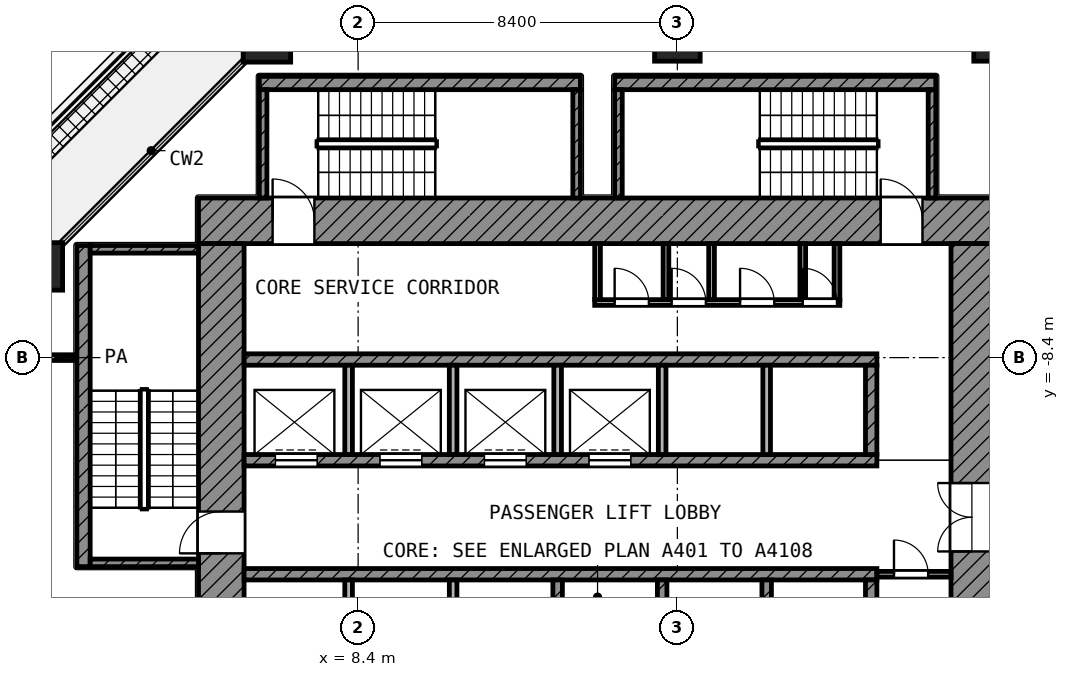
"""IFC4 building model, lengths in metres.
Left out: names, types, materials, properties, quantities, classifications, styles, units other than length and angle.
Written with IfcOpenShell. Run it as: python <this file> out.ifc"""

import sys

from ifc_helpers import new_model, si_unit, direction, frame, frame_2d, origin, origin_2d, place, context, subcontext, project, spatial, rectangle, extrude, element, fill, save


model = new_model("IFC4")
c1 = context("Model", 3, precision=1e-05, world=origin(), true_north=direction((0.0, 1.0)))
c2 = subcontext(c1, "Body", "Model", "MODEL_VIEW")
j1 = project(units=[si_unit("LENGTHUNIT", "METRE"), si_unit("PLANEANGLEUNIT", "RADIAN")], contexts=[c1])
p1 = place(None, origin())
s1 = spatial("IfcSite", under=j1, at=p1, CompositionType="ELEMENT")
p2 = place(p1, origin())
s2 = spatial("IfcBuilding", under=s1, at=p2, CompositionType="ELEMENT")
p3 = place(p2, frame((0.0, 0.0, 64.4)))
s3 = spatial("IfcBuildingStorey", under=s2, at=p3, CompositionType="ELEMENT", Elevation=64.4)
p4 = place(p3, frame((6.0, 0.0, 0.0), z_axis=(0.0, 0.0, 1.0), x_axis=(1.0, 0.0, 0.0)))
e1 = element("IfcColumn", 1, at=p4, inside=s3, PredefinedType="COLUMN", context=c2, shape_type="SweptSolid", body=[
    extrude(rectangle(XDim=1.25, YDim=1.25, at=origin_2d()), origin(), (0.0, 0.0, 1.0), 4.2),
])
for number, where, z_axis, x_axis in (
    (2, (16.8, 0.0, 0.0), (0.0, 0.0, 1.0), (1.0, 0.0, 0.0)),
    (3, (25.2, 0.0, 0.0), (0.0, 0.0, 1.0), (1.0, 0.0, 0.0)),
):
    element("IfcColumn", number, at=place(p3, frame(where, z_axis=z_axis, x_axis=x_axis)), inside=s3, PredefinedType="COLUMN", context=c2, shape_type="SweptSolid", body=[
        extrude(rectangle(XDim=1.2, YDim=1.2, at=origin_2d()), origin(), (0.0, 0.0, 1.0), 4.2),
    ])
p5 = place(p3, frame((0.0, -6.0, 0.0), z_axis=(0.0, 0.0, 1.0), x_axis=(1.0, 0.0, 0.0)))
e4 = element("IfcColumn", 4, at=p5, inside=s3, PredefinedType="COLUMN", context=c2, shape_type="SweptSolid", body=[
    extrude(rectangle(XDim=1.25, YDim=1.25, at=origin_2d()), origin(), (0.0, 0.0, 1.0), 4.2),
])
p6 = place(p3, frame((4.2, -4.8, 0.0), z_axis=(0.0, 0.0, 1.0), x_axis=(1.0, 0.0, 0.0)))
e5 = element("IfcWall", 5, at=p6, inside=s3, PredefinedType="SHEAR", context=c2, shape_type="SweptSolid", body=[
    extrude(rectangle(XDim=20.9, YDim=1.2, at=frame_2d((10.45, 0.0))), origin(), (0.0, 0.0, 1.0), 3.9),
])
p7 = place(p6, frame((1.95, 0.0, 0.0)))
e6 = element("IfcOpeningElement", 6, at=p7, cuts=e5, PredefinedType="OPENING", context=c2, shape_type="SweptSolid", body=[
    extrude(rectangle(XDim=1.1, YDim=2.1, at=frame_2d((0.55, 1.05))), frame((0.0, 0.61, 0.0), z_axis=(0.0, -1.0, 0.0), x_axis=(1.0, 0.0, 0.0)), (0.0, 0.0, 1.0), 1.22),
])
p8 = place(p6, frame((17.95, 0.0, 0.0)))
e7 = element("IfcOpeningElement", 7, at=p8, cuts=e5, PredefinedType="OPENING", context=c2, shape_type="SweptSolid", body=[
    extrude(rectangle(XDim=1.1, YDim=2.1, at=frame_2d((0.55, 1.05))), frame((0.0, 0.61, 0.0), z_axis=(0.0, -1.0, 0.0), x_axis=(1.0, 0.0, 0.0)), (0.0, 0.0, 1.0), 1.22),
])
p9 = place(p3, frame((4.8, -25.1, 0.0), z_axis=(0.0, 0.0, 1.0), x_axis=(0.0, 1.0, 0.0)))
e8 = element("IfcWall", 8, at=p9, inside=s3, PredefinedType="SHEAR", context=c2, shape_type="SweptSolid", body=[
    extrude(rectangle(XDim=19.7, YDim=1.2, at=frame_2d((9.85, 0.0))), origin(), (0.0, 0.0, 1.0), 3.9),
])
p10 = place(p9, frame((11.55, 0.0, 0.0)))
e9 = element("IfcOpeningElement", 9, at=p10, cuts=e8, PredefinedType="OPENING", context=c2, shape_type="SweptSolid", body=[
    extrude(rectangle(XDim=1.1, YDim=2.1, at=frame_2d((0.55, 1.05))), frame((0.0, 0.61, 0.0), z_axis=(0.0, -1.0, 0.0), x_axis=(1.0, 0.0, 0.0)), (0.0, 0.0, 1.0), 1.22),
])
p11 = place(p9, frame((2.25, 0.0, 0.0)))
e10 = element("IfcOpeningElement", 10, at=p11, cuts=e8, PredefinedType="OPENING", context=c2, shape_type="SweptSolid", body=[
    extrude(rectangle(XDim=1.1, YDim=2.1, at=frame_2d((0.55, 1.05))), frame((0.0, 0.61, 0.0), z_axis=(0.0, -1.0, 0.0), x_axis=(1.0, 0.0, 0.0)), (0.0, 0.0, 1.0), 1.22),
])
p12 = place(p3, frame((24.55, -24.0, 0.0), z_axis=(0.0, 0.0, 1.0), x_axis=(0.0, 1.0, 0.0)))
e11 = element("IfcWall", 11, at=p12, inside=s3, PredefinedType="SHEAR", context=c2, shape_type="SweptSolid", body=[
    extrude(rectangle(XDim=18.6, YDim=1.1, at=frame_2d((9.3, 0.0))), origin(), (0.0, 0.0, 1.0), 3.9),
])
p13 = place(p12, frame((10.5, 0.0, 0.0)))
e12 = element("IfcOpeningElement", 12, at=p13, cuts=e11, PredefinedType="OPENING", context=c2, shape_type="SweptSolid", body=[
    extrude(rectangle(XDim=1.8, YDim=2.1, at=frame_2d((0.9, 1.05))), frame((0.0, 0.56, 0.0), z_axis=(0.0, -1.0, 0.0), x_axis=(1.0, 0.0, 0.0)), (0.0, 0.0, 1.0), 1.12),
])
p14 = place(p3, frame((5.4, -8.45, 0.0), z_axis=(0.0, 0.0, 1.0), x_axis=(1.0, 0.0, 0.0)))
e13 = element("IfcWall", 13, at=p14, inside=s3, PredefinedType="SHEAR", context=c2, shape_type="SweptSolid", body=[
    extrude(rectangle(XDim=16.65, YDim=0.3, at=frame_2d((8.325, 0.0))), origin(), (0.0, 0.0, 1.0), 3.9),
])
p15 = place(p3, frame((5.4, -11.1, 0.0), z_axis=(0.0, 0.0, 1.0), x_axis=(1.0, 0.0, 0.0)))
e14 = element("IfcWall", 14, at=p15, inside=s3, PredefinedType="SHEAR", context=c2, shape_type="SweptSolid", body=[
    extrude(rectangle(XDim=16.65, YDim=0.3, at=frame_2d((8.325, 0.0))), origin(), (0.0, 0.0, 1.0), 3.9),
])
p16 = place(p15, frame((0.825, 0.0, 0.0)))
e15 = element("IfcOpeningElement", 15, at=p16, cuts=e14, PredefinedType="OPENING", context=c2, shape_type="SweptSolid", body=[
    extrude(rectangle(XDim=1.1, YDim=2.1, at=frame_2d((0.55, 1.05))), frame((0.0, 0.16, 0.0), z_axis=(0.0, -1.0, 0.0), x_axis=(1.0, 0.0, 0.0)), (0.0, 0.0, 1.0), 0.32),
])
p17 = place(p15, frame((3.575, 0.0, 0.0)))
e16 = element("IfcOpeningElement", 16, at=p17, cuts=e14, PredefinedType="OPENING", context=c2, shape_type="SweptSolid", body=[
    extrude(rectangle(XDim=1.1, YDim=2.1, at=frame_2d((0.55, 1.05))), frame((0.0, 0.16, 0.0), z_axis=(0.0, -1.0, 0.0), x_axis=(1.0, 0.0, 0.0)), (0.0, 0.0, 1.0), 0.32),
])
p18 = place(p15, frame((6.325, 0.0, 0.0)))
e17 = element("IfcOpeningElement", 17, at=p18, cuts=e14, PredefinedType="OPENING", context=c2, shape_type="SweptSolid", body=[
    extrude(rectangle(XDim=1.1, YDim=2.1, at=frame_2d((0.55, 1.05))), frame((0.0, 0.16, 0.0), z_axis=(0.0, -1.0, 0.0), x_axis=(1.0, 0.0, 0.0)), (0.0, 0.0, 1.0), 0.32),
])
p19 = place(p15, frame((9.075, 0.0, 0.0)))
e18 = element("IfcOpeningElement", 18, at=p19, cuts=e14, PredefinedType="OPENING", context=c2, shape_type="SweptSolid", body=[
    extrude(rectangle(XDim=1.1, YDim=2.1, at=frame_2d((0.55, 1.05))), frame((0.0, 0.16, 0.0), z_axis=(0.0, -1.0, 0.0), x_axis=(1.0, 0.0, 0.0)), (0.0, 0.0, 1.0), 0.32),
])
p20 = place(p3, frame((5.4, -14.1, 0.0), z_axis=(0.0, 0.0, 1.0), x_axis=(1.0, 0.0, 0.0)))
e19 = element("IfcWall", 19, at=p20, inside=s3, PredefinedType="SHEAR", context=c2, shape_type="SweptSolid", body=[
    extrude(rectangle(XDim=16.65, YDim=0.3, at=frame_2d((8.325, 0.0))), origin(), (0.0, 0.0, 1.0), 3.9),
])
p21 = place(p3, frame((21.9, -10.95, 0.0), z_axis=(0.0, 0.0, 1.0), x_axis=(0.0, 1.0, 0.0)))
e20 = element("IfcWall", 20, at=p21, inside=s3, PredefinedType="SHEAR", context=c2, shape_type="SweptSolid", body=[
    extrude(rectangle(XDim=2.35, YDim=0.3, at=frame_2d((1.175, 0.0))), origin(), (0.0, 0.0, 1.0), 3.9),
])
p22 = place(p3, frame((21.9, -16.6, 0.0), z_axis=(0.0, 0.0, 1.0), x_axis=(0.0, 1.0, 0.0)))
e21 = element("IfcWall", 21, at=p22, inside=s3, PredefinedType="SHEAR", context=c2, shape_type="SweptSolid", body=[
    extrude(rectangle(XDim=2.35, YDim=0.3, at=frame_2d((1.175, 0.0))), origin(), (0.0, 0.0, 1.0), 3.9),
])
for number, where, z_axis, x_axis in (
    (22, (8.15, -10.95, 0.0), (0.0, 0.0, 1.0), (0.0, 1.0, 0.0)),
    (23, (10.9, -10.95, 0.0), (0.0, 0.0, 1.0), (0.0, 1.0, 0.0)),
    (24, (13.65, -10.95, 0.0), (0.0, 0.0, 1.0), (0.0, 1.0, 0.0)),
    (25, (16.4, -10.95, 0.0), (0.0, 0.0, 1.0), (0.0, 1.0, 0.0)),
    (26, (19.15, -10.95, 0.0), (0.0, 0.0, 1.0), (0.0, 1.0, 0.0)),
):
    element("IfcWall", number, at=place(p3, frame(where, z_axis=z_axis, x_axis=x_axis)), inside=s3, PredefinedType="PARTITIONING", context=c2, shape_type="SweptSolid", body=[
        extrude(rectangle(XDim=2.35, YDim=0.2, at=frame_2d((1.175, 0.0))), origin(), (0.0, 0.0, 1.0), 3.9),
    ])
for number, where, z_axis, x_axis in (
    (27, (8.15, -16.6, 0.0), (0.0, 0.0, 1.0), (0.0, 1.0, 0.0)),
    (28, (10.9, -16.6, 0.0), (0.0, 0.0, 1.0), (0.0, 1.0, 0.0)),
):
    element("IfcWall", number, at=place(p3, frame(where, z_axis=z_axis, x_axis=x_axis)), inside=s3, PredefinedType="PARTITIONING", context=c2, shape_type="SweptSolid", body=[
        extrude(rectangle(XDim=2.35, YDim=0.2, at=frame_2d((1.175, 0.0))), origin(), (0.0, 0.0, 1.0), 3.9),
    ])
for number, where, z_axis, x_axis in (
    (29, (13.65, -16.6, 0.0), (0.0, 0.0, 1.0), (0.0, 1.0, 0.0)),
    (30, (16.4, -16.6, 0.0), (0.0, 0.0, 1.0), (0.0, 1.0, 0.0)),
    (31, (19.15, -16.6, 0.0), (0.0, 0.0, 1.0), (0.0, 1.0, 0.0)),
):
    element("IfcWall", number, at=place(p3, frame(where, z_axis=z_axis, x_axis=x_axis)), inside=s3, PredefinedType="SHEAR", context=c2, shape_type="SweptSolid", body=[
        extrude(rectangle(XDim=2.35, YDim=0.25, at=frame_2d((1.175, 0.0))), origin(), (0.0, 0.0, 1.0), 3.9),
    ])
p23 = place(p3, frame((22.05, -14.1, 0.0), z_axis=(0.0, 0.0, 1.0), x_axis=(1.0, 0.0, 0.0)))
e32 = element("IfcWall", 32, at=p23, inside=s3, PredefinedType="PARTITIONING", context=c2, shape_type="SweptSolid", body=[
    extrude(rectangle(XDim=1.95, YDim=0.15, at=frame_2d((0.975, 0.0))), origin(), (0.0, 0.0, 1.0), 3.9),
])
p24 = place(p23, frame((0.45, 0.0, 0.0)))
e33 = element("IfcOpeningElement", 33, at=p24, cuts=e32, PredefinedType="OPENING", context=c2, shape_type="SweptSolid", body=[
    extrude(rectangle(XDim=0.9, YDim=2.1, at=frame_2d((0.45, 1.05))), frame((0.0, 0.085, 0.0), z_axis=(0.0, -1.0, 0.0), x_axis=(1.0, 0.0, 0.0)), (0.0, 0.0, 1.0), 0.17),
])
p25 = place(p3, frame((14.625, -6.95, 0.0), z_axis=(0.0, 0.0, 1.0), x_axis=(1.0, 0.0, 0.0)))
e34 = element("IfcWall", 34, at=p25, inside=s3, PredefinedType="PARTITIONING", context=c2, shape_type="SweptSolid", body=[
    extrude(rectangle(XDim=6.45, YDim=0.15, at=frame_2d((3.225, 0.0))), origin(), (0.0, 0.0, 1.0), 3.9),
])
p26 = place(p25, frame((0.525, 0.0, 0.0)))
e35 = element("IfcOpeningElement", 35, at=p26, cuts=e34, PredefinedType="OPENING", context=c2, shape_type="SweptSolid", body=[
    extrude(rectangle(XDim=0.9, YDim=2.1, at=frame_2d((0.45, 1.05))), frame((0.0, 0.085, 0.0), z_axis=(0.0, -1.0, 0.0), x_axis=(1.0, 0.0, 0.0)), (0.0, 0.0, 1.0), 0.17),
])
p27 = place(p25, frame((2.025, 0.0, 0.0)))
e36 = element("IfcOpeningElement", 36, at=p27, cuts=e34, PredefinedType="OPENING", context=c2, shape_type="SweptSolid", body=[
    extrude(rectangle(XDim=0.9, YDim=2.1, at=frame_2d((0.45, 1.05))), frame((0.0, 0.085, 0.0), z_axis=(0.0, -1.0, 0.0), x_axis=(1.0, 0.0, 0.0)), (0.0, 0.0, 1.0), 0.17),
])
p28 = place(p25, frame((3.825, 0.0, 0.0)))
e37 = element("IfcOpeningElement", 37, at=p28, cuts=e34, PredefinedType="OPENING", context=c2, shape_type="SweptSolid", body=[
    extrude(rectangle(XDim=0.9, YDim=2.1, at=frame_2d((0.45, 1.05))), frame((0.0, 0.085, 0.0), z_axis=(0.0, -1.0, 0.0), x_axis=(1.0, 0.0, 0.0)), (0.0, 0.0, 1.0), 0.17),
])
p29 = place(p25, frame((5.475, 0.0, 0.0)))
e38 = element("IfcOpeningElement", 38, at=p29, cuts=e34, PredefinedType="OPENING", context=c2, shape_type="SweptSolid", body=[
    extrude(rectangle(XDim=0.9, YDim=2.1, at=frame_2d((0.45, 1.05))), frame((0.0, 0.085, 0.0), z_axis=(0.0, -1.0, 0.0), x_axis=(1.0, 0.0, 0.0)), (0.0, 0.0, 1.0), 0.17),
])
for number, where, z_axis, x_axis in (
    (39, (14.7, -6.875, 0.0), (0.0, 0.0, 1.0), (0.0, 1.0, 0.0)),
    (40, (16.5, -6.875, 0.0), (0.0, 0.0, 1.0), (0.0, 1.0, 0.0)),
    (41, (17.7, -6.875, 0.0), (0.0, 0.0, 1.0), (0.0, 1.0, 0.0)),
    (42, (20.1, -6.875, 0.0), (0.0, 0.0, 1.0), (0.0, 1.0, 0.0)),
    (43, (21.0, -6.875, 0.0), (0.0, 0.0, 1.0), (0.0, 1.0, 0.0)),
):
    element("IfcWall", number, at=place(p3, frame(where, z_axis=z_axis, x_axis=x_axis)), inside=s3, PredefinedType="PARTITIONING", context=c2, shape_type="SweptSolid", body=[
        extrude(rectangle(XDim=1.475, YDim=0.15, at=frame_2d((0.738, 0.0))), origin(), (0.0, 0.0, 1.0), 3.9),
    ])
p30 = place(p3, frame((1.175, -13.9, 0.0), z_axis=(0.0, 0.0, 1.0), x_axis=(0.0, 1.0, 0.0)))
e44 = element("IfcWall", 44, at=p30, inside=s3, PredefinedType="SHEAR", context=c2, shape_type="SweptSolid", body=[
    extrude(rectangle(XDim=8.45, YDim=0.35, at=frame_2d((4.225, 0.0))), origin(), (0.0, 0.0, 1.0), 3.9),
])
for number, where, z_axis, x_axis in (
    (45, (1.35, -5.55, 0.0), (0.0, 0.0, 1.0), (1.0, 0.0, 0.0)),
    (46, (1.35, -13.8, 0.0), (0.0, 0.0, 1.0), (1.0, 0.0, 0.0)),
):
    element("IfcWall", number, at=place(p3, frame(where, z_axis=z_axis, x_axis=x_axis)), inside=s3, PredefinedType="SHEAR", context=c2, shape_type="SweptSolid", body=[
        extrude(rectangle(XDim=2.85, YDim=0.2, at=frame_2d((1.425, 0.0))), origin(), (0.0, 0.0, 1.0), 3.9),
    ])
p31 = place(p3, frame((5.8, -1.175, 0.0), z_axis=(0.0, 0.0, 1.0), x_axis=(1.0, 0.0, 0.0)))
e47 = element("IfcWall", 47, at=p31, inside=s3, PredefinedType="SHEAR", context=c2, shape_type="SweptSolid", body=[
    extrude(rectangle(XDim=8.45, YDim=0.35, at=frame_2d((4.225, 0.0))), origin(), (0.0, 0.0, 1.0), 3.9),
])
for number, where, z_axis, x_axis in (
    (48, (5.9, -4.2, 0.0), (0.0, 0.0, 1.0), (0.0, 1.0, 0.0)),
    (49, (14.15, -4.2, 0.0), (0.0, 0.0, 1.0), (0.0, 1.0, 0.0)),
):
    element("IfcWall", number, at=place(p3, frame(where, z_axis=z_axis, x_axis=x_axis)), inside=s3, PredefinedType="SHEAR", context=c2, shape_type="SweptSolid", body=[
        extrude(rectangle(XDim=2.85, YDim=0.2, at=frame_2d((1.425, 0.0))), origin(), (0.0, 0.0, 1.0), 3.9),
    ])
p32 = place(p3, frame((15.15, -1.175, 0.0), z_axis=(0.0, 0.0, 1.0), x_axis=(1.0, 0.0, 0.0)))
e50 = element("IfcWall", 50, at=p32, inside=s3, PredefinedType="SHEAR", context=c2, shape_type="SweptSolid", body=[
    extrude(rectangle(XDim=8.45, YDim=0.35, at=frame_2d((4.225, 0.0))), origin(), (0.0, 0.0, 1.0), 3.9),
])
for number, where, z_axis, x_axis in (
    (51, (15.25, -4.2, 0.0), (0.0, 0.0, 1.0), (0.0, 1.0, 0.0)),
    (52, (23.5, -4.2, 0.0), (0.0, 0.0, 1.0), (0.0, 1.0, 0.0)),
):
    element("IfcWall", number, at=place(p3, frame(where, z_axis=z_axis, x_axis=x_axis)), inside=s3, PredefinedType="SHEAR", context=c2, shape_type="SweptSolid", body=[
        extrude(rectangle(XDim=2.85, YDim=0.2, at=frame_2d((1.425, 0.0))), origin(), (0.0, 0.0, 1.0), 3.9),
    ])
p33 = place(p3, frame((0.08, -8.4, 0.0), z_axis=(0.0, 0.0, 1.0), x_axis=(1.0, 0.0, 0.0)))
e53 = element("IfcWall", 53, at=p33, inside=s3, PredefinedType="PARTITIONING", context=c2, shape_type="SweptSolid", body=[
    extrude(rectangle(XDim=0.89, YDim=0.15, at=frame_2d((0.445, 0.0))), origin(), (0.0, 0.0, 1.0), 3.9),
])
p34 = place(p16, origin())
e54 = element("IfcDoor", 54, at=p34, inside=s3, OperationType="DOUBLE_DOOR_SLIDING", PredefinedType="DOOR", context=c2, shape_type="SweptSolid", body=[
    extrude(rectangle(XDim=1.1, YDim=2.1, at=frame_2d((0.55, 1.05))), frame((0.0, 0.025, 0.0), z_axis=(0.0, -1.0, 0.0), x_axis=(1.0, 0.0, 0.0)), (0.0, 0.0, 1.0), 0.05),
])
fill(e15, e54)
p35 = place(p17, origin())
e55 = element("IfcDoor", 55, at=p35, inside=s3, OperationType="DOUBLE_DOOR_SLIDING", PredefinedType="DOOR", context=c2, shape_type="SweptSolid", body=[
    extrude(rectangle(XDim=1.1, YDim=2.1, at=frame_2d((0.55, 1.05))), frame((0.0, 0.025, 0.0), z_axis=(0.0, -1.0, 0.0), x_axis=(1.0, 0.0, 0.0)), (0.0, 0.0, 1.0), 0.05),
])
fill(e16, e55)
p36 = place(p18, origin())
e56 = element("IfcDoor", 56, at=p36, inside=s3, OperationType="DOUBLE_DOOR_SLIDING", PredefinedType="DOOR", context=c2, shape_type="SweptSolid", body=[
    extrude(rectangle(XDim=1.1, YDim=2.1, at=frame_2d((0.55, 1.05))), frame((0.0, 0.025, 0.0), z_axis=(0.0, -1.0, 0.0), x_axis=(1.0, 0.0, 0.0)), (0.0, 0.0, 1.0), 0.05),
])
fill(e17, e56)
p37 = place(p19, origin())
e57 = element("IfcDoor", 57, at=p37, inside=s3, OperationType="DOUBLE_DOOR_SLIDING", PredefinedType="DOOR", context=c2, shape_type="SweptSolid", body=[
    extrude(rectangle(XDim=1.1, YDim=2.1, at=frame_2d((0.55, 1.05))), frame((0.0, 0.025, 0.0), z_axis=(0.0, -1.0, 0.0), x_axis=(1.0, 0.0, 0.0)), (0.0, 0.0, 1.0), 0.05),
])
fill(e18, e57)
p38 = place(p10, origin())
e58 = element("IfcDoor", 58, at=p38, inside=s3, OperationType="SINGLE_SWING_LEFT", PredefinedType="DOOR", context=c2, shape_type="SweptSolid", body=[
    extrude(rectangle(XDim=1.1, YDim=2.1, at=frame_2d((0.55, 1.05))), frame((0.0, 0.025, 0.0), z_axis=(0.0, -1.0, 0.0), x_axis=(1.0, 0.0, 0.0)), (0.0, 0.0, 1.0), 0.05),
])
fill(e9, e58)
p39 = place(p7, origin())
e59 = element("IfcDoor", 59, at=p39, inside=s3, OperationType="SINGLE_SWING_LEFT", PredefinedType="DOOR", context=c2, shape_type="SweptSolid", body=[
    extrude(rectangle(XDim=1.1, YDim=2.1, at=frame_2d((0.55, 1.05))), frame((0.0, 0.025, 0.0), z_axis=(0.0, -1.0, 0.0), x_axis=(1.0, 0.0, 0.0)), (0.0, 0.0, 1.0), 0.05),
])
fill(e6, e59)
p40 = place(p8, origin())
e60 = element("IfcDoor", 60, at=p40, inside=s3, OperationType="SINGLE_SWING_LEFT", PredefinedType="DOOR", context=c2, shape_type="SweptSolid", body=[
    extrude(rectangle(XDim=1.1, YDim=2.1, at=frame_2d((0.55, 1.05))), frame((0.0, 0.025, 0.0), z_axis=(0.0, -1.0, 0.0), x_axis=(1.0, 0.0, 0.0)), (0.0, 0.0, 1.0), 0.05),
])
fill(e7, e60)
p41 = place(p13, origin())
e61 = element("IfcDoor", 61, at=p41, inside=s3, OperationType="DOUBLE_DOOR_SINGLE_SWING", PredefinedType="DOOR", context=c2, shape_type="SweptSolid", body=[
    extrude(rectangle(XDim=1.8, YDim=2.1, at=frame_2d((0.9, 1.05))), frame((0.0, 0.025, 0.0), z_axis=(0.0, -1.0, 0.0), x_axis=(1.0, 0.0, 0.0)), (0.0, 0.0, 1.0), 0.05),
])
fill(e12, e61)
p42 = place(p26, origin())
e62 = element("IfcDoor", 62, at=p42, inside=s3, OperationType="SINGLE_SWING_LEFT", PredefinedType="DOOR", context=c2, shape_type="SweptSolid", body=[
    extrude(rectangle(XDim=0.9, YDim=2.1, at=frame_2d((0.45, 1.05))), frame((0.0, 0.025, 0.0), z_axis=(0.0, -1.0, 0.0), x_axis=(1.0, 0.0, 0.0)), (0.0, 0.0, 1.0), 0.05),
])
fill(e35, e62)
p43 = place(p27, origin())
e63 = element("IfcDoor", 63, at=p43, inside=s3, OperationType="SINGLE_SWING_LEFT", PredefinedType="DOOR", context=c2, shape_type="SweptSolid", body=[
    extrude(rectangle(XDim=0.9, YDim=2.1, at=frame_2d((0.45, 1.05))), frame((0.0, 0.025, 0.0), z_axis=(0.0, -1.0, 0.0), x_axis=(1.0, 0.0, 0.0)), (0.0, 0.0, 1.0), 0.05),
])
fill(e36, e63)
p44 = place(p28, origin())
e64 = element("IfcDoor", 64, at=p44, inside=s3, OperationType="SINGLE_SWING_LEFT", PredefinedType="DOOR", context=c2, shape_type="SweptSolid", body=[
    extrude(rectangle(XDim=0.9, YDim=2.1, at=frame_2d((0.45, 1.05))), frame((0.0, 0.025, 0.0), z_axis=(0.0, -1.0, 0.0), x_axis=(1.0, 0.0, 0.0)), (0.0, 0.0, 1.0), 0.05),
])
fill(e37, e64)
p45 = place(p29, origin())
e65 = element("IfcDoor", 65, at=p45, inside=s3, OperationType="SINGLE_SWING_LEFT", PredefinedType="DOOR", context=c2, shape_type="SweptSolid", body=[
    extrude(rectangle(XDim=0.9, YDim=2.1, at=frame_2d((0.45, 1.05))), frame((0.0, 0.025, 0.0), z_axis=(0.0, -1.0, 0.0), x_axis=(1.0, 0.0, 0.0)), (0.0, 0.0, 1.0), 0.05),
])
fill(e38, e65)
p46 = place(p24, origin())
e66 = element("IfcDoor", 66, at=p46, inside=s3, OperationType="SINGLE_SWING_LEFT", PredefinedType="DOOR", context=c2, shape_type="SweptSolid", body=[
    extrude(rectangle(XDim=0.9, YDim=2.1, at=frame_2d((0.45, 1.05))), frame((0.0, 0.025, 0.0), z_axis=(0.0, -1.0, 0.0), x_axis=(1.0, 0.0, 0.0)), (0.0, 0.0, 1.0), 0.05),
])
fill(e33, e66)
save(model, sys.argv[1])
